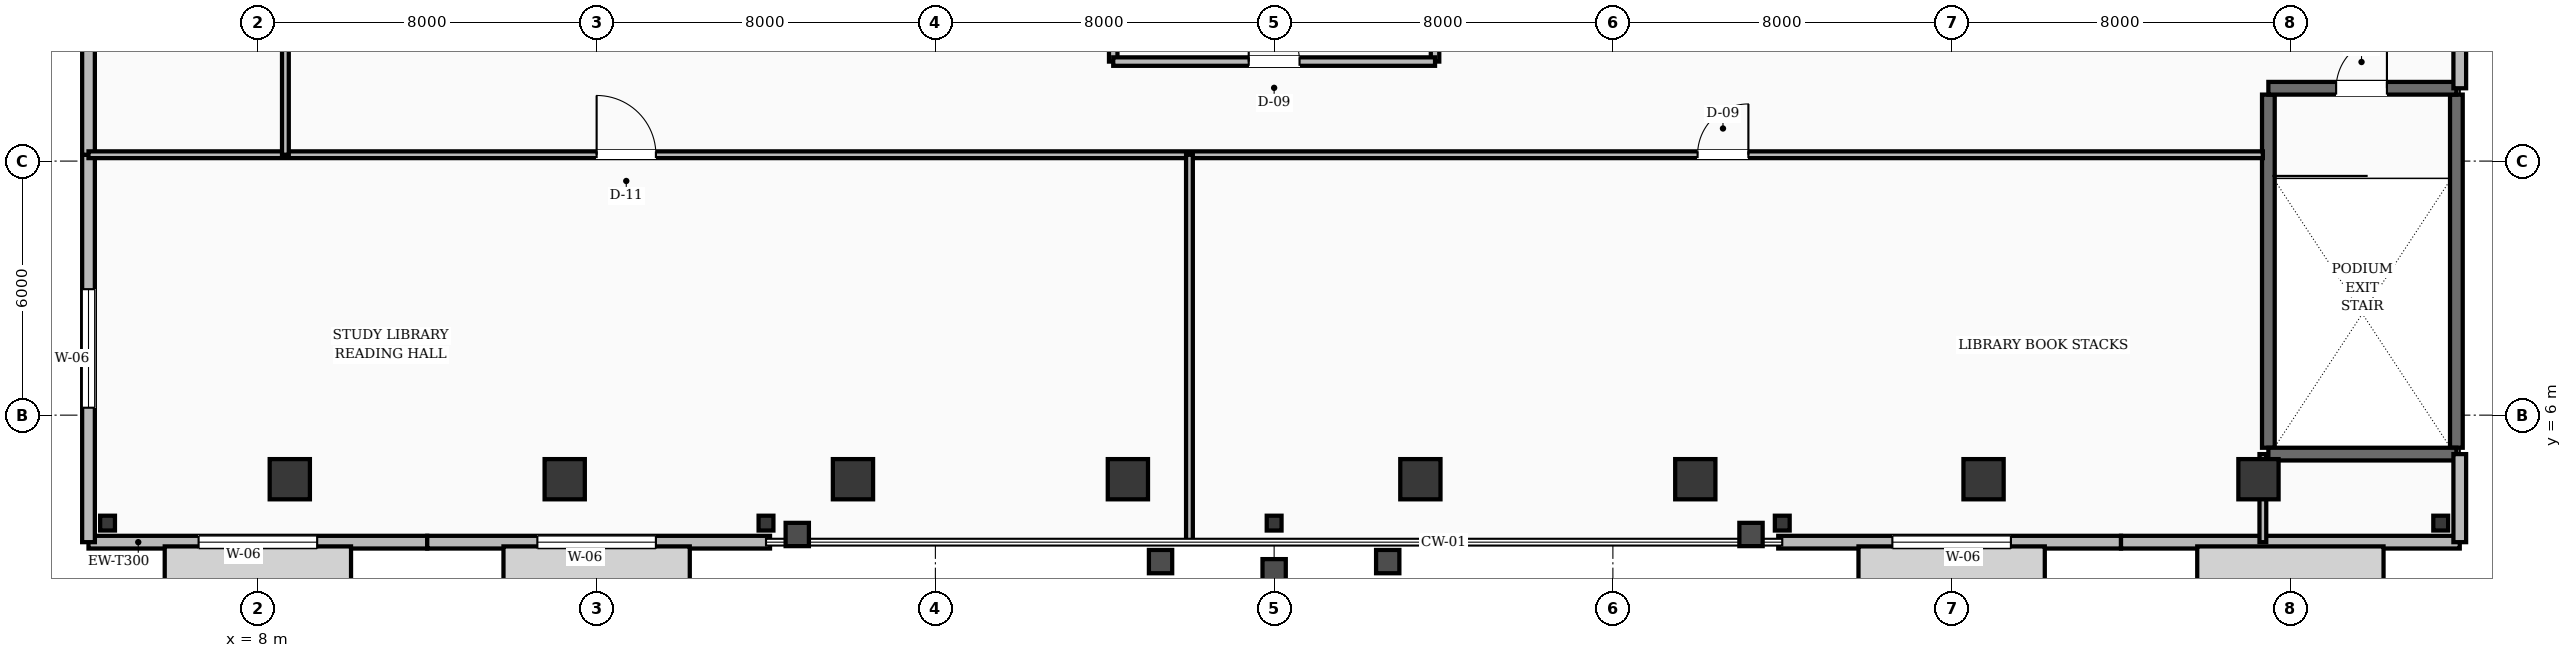
"""IFC4 building model, lengths in metres.
Left out: names, types, materials, properties, quantities, classifications, styles, units other than length and angle.
Written with IfcOpenShell. Run it as: python <this file> out.ifc"""

import sys

from ifc_helpers import new_model, si_unit, direction, frame, frame_2d, origin, origin_2d, place, context, subcontext, project, spatial, rectangle, hollow_circle, i_section, extrude, element, fill, save


model = new_model("IFC4")
c1 = context("Model", 3, precision=1e-05, world=origin(), true_north=direction((0.0, 1.0)))
c2 = subcontext(c1, "Body", "Model", "MODEL_VIEW")
j1 = project(units=[si_unit("LENGTHUNIT", "METRE"), si_unit("PLANEANGLEUNIT", "RADIAN")], contexts=[c1])
p1 = place(None, origin())
s1 = spatial("IfcSite", under=j1, at=p1, CompositionType="ELEMENT")
p2 = place(p1, origin())
s2 = spatial("IfcBuilding", under=s1, at=p2, CompositionType="ELEMENT")
p3 = place(p2, frame((0.0, 0.0, 19.6)))
s3 = spatial("IfcBuildingStorey", under=s2, at=p3, CompositionType="ELEMENT", Elevation=19.6)
for number, where, z_axis, x_axis in (
    (1, (55.48, 5.23, 0.0), (0.0, 0.0, 1.0), (0.0, 1.0, 0.0)),
    (2, (59.92, 5.23, 0.0), (0.0, 0.0, 1.0), (0.0, 1.0, 0.0)),
):
    element("IfcWall", number, at=place(p3, frame(where, z_axis=z_axis, x_axis=x_axis)), inside=s3, PredefinedType="SHEAR", context=c2, shape_type="SweptSolid", body=[
        extrude(rectangle(XDim=8.34, YDim=0.3, at=frame_2d((4.17, 0.0))), origin(), (0.0, 0.0, 1.0), 4.8),
    ])
p4 = place(p3, frame((55.48, 5.08, 0.0), z_axis=(0.0, 0.0, 1.0), x_axis=(1.0, 0.0, 0.0)))
e3 = element("IfcWall", 3, at=p4, inside=s3, PredefinedType="SHEAR", context=c2, shape_type="SweptSolid", body=[
    extrude(rectangle(XDim=4.44, YDim=0.3, at=frame_2d((2.22, 0.0))), origin(), (0.0, 0.0, 1.0), 4.8),
])
p5 = place(p3, frame((55.48, 13.72, 0.0), z_axis=(0.0, 0.0, 1.0), x_axis=(1.0, 0.0, 0.0)))
e4 = element("IfcWall", 4, at=p5, inside=s3, PredefinedType="SHEAR", context=c2, shape_type="SweptSolid", body=[
    extrude(rectangle(XDim=4.44, YDim=0.3, at=frame_2d((2.22, 0.0))), origin(), (0.0, 0.0, 1.0), 4.8),
])
p6 = place(p5, frame((1.6, 0.0, 0.0)))
e5 = element("IfcOpeningElement", 5, at=p6, cuts=e4, PredefinedType="OPENING", context=c2, shape_type="SweptSolid", body=[
    extrude(rectangle(XDim=1.2, YDim=2.1, at=frame_2d((0.6, 1.05))), frame((0.0, 0.16, 0.0), z_axis=(0.0, -1.0, 0.0), x_axis=(1.0, 0.0, 0.0)), (0.0, 0.0, 1.0), 0.32),
])
for number, where, z_axis, x_axis in (
    (6, (4.45, 3.45, 0.0), (0.0, 0.0, 1.0), (1.0, 0.0, 0.0)),
    (7, (20.0, 3.45, 0.0), (0.0, 0.0, 1.0), (1.0, 0.0, 0.0)),
    (8, (32.0, 3.45, 0.0), (0.0, 0.0, 1.0), (1.0, 0.0, 0.0)),
    (9, (44.0, 3.45, 0.0), (0.0, 0.0, 1.0), (1.0, 0.0, 0.0)),
    (10, (59.55, 3.45, 0.0), (0.0, 0.0, 1.0), (1.0, 0.0, 0.0)),
):
    element("IfcColumn", number, at=place(p3, frame(where, z_axis=z_axis, x_axis=x_axis)), inside=s3, PredefinedType="COLUMN", context=c2, shape_type="SweptSolid", body=[
        extrude(i_section(OverallWidth=0.35, OverallDepth=0.35, WebThickness=0.012, FlangeThickness=0.019, FilletRadius=0.016, at=origin_2d()), origin(), (0.0, 0.0, 1.0), 4.8),
    ])
for number, where, z_axis, x_axis in (
    (11, (9.008, 4.374, 0.0), (-0.105, 0.047, 0.993), (-0.407, -0.913, 0.0)),
    (12, (14.992, 4.374, 0.0), (0.105, 0.047, 0.993), (-0.407, 0.913, 0.0)),
    (13, (22.308, 4.374, 0.0), (-0.105, 0.047, 0.993), (-0.407, -0.913, 0.0)),
    (14, (28.292, 4.374, 0.0), (0.105, 0.047, 0.993), (-0.407, 0.913, 0.0)),
    (15, (35.708, 4.374, 0.0), (-0.105, 0.047, 0.993), (-0.407, -0.913, 0.0)),
    (16, (41.692, 4.374, 0.0), (0.105, 0.047, 0.993), (-0.407, 0.913, 0.0)),
    (17, (49.008, 4.374, 0.0), (-0.105, 0.047, 0.993), (-0.407, -0.913, 0.0)),
    (18, (54.992, 4.374, 0.0), (0.105, 0.047, 0.993), (-0.407, 0.913, 0.0)),
):
    element("IfcColumn", number, at=place(p3, frame(where, z_axis=z_axis, x_axis=x_axis)), inside=s3, PredefinedType="COLUMN", context=c2, shape_type="SweptSolid", body=[
        extrude(hollow_circle(Radius=0.475, WallThickness=0.045, at=origin_2d()), origin(), (0.0, 0.0, 1.0), 4.832),
    ])
p7 = place(p3, frame((4.0, 3.0, 0.0), z_axis=(0.0, 0.0, 1.0), x_axis=(1.0, 0.0, 0.0)))
e19 = element("IfcWall", 19, at=p7, inside=s3, PredefinedType="STANDARD", context=c2, shape_type="SweptSolid", body=[
    extrude(rectangle(XDim=8.0, YDim=0.3, at=frame_2d((4.0, 0.0))), origin(), (0.0, 0.0, 1.0), 3.47),
])
p8 = place(p7, frame((2.6, 0.0, 0.85)))
e20 = element("IfcOpeningElement", 20, at=p8, cuts=e19, PredefinedType="OPENING", context=c2, shape_type="SweptSolid", body=[
    extrude(rectangle(XDim=2.8, YDim=2.3, at=frame_2d((1.4, 1.15))), frame((0.0, 0.16, 0.0), z_axis=(0.0, -1.0, 0.0), x_axis=(1.0, 0.0, 0.0)), (0.0, 0.0, 1.0), 0.32),
])
p9 = place(p3, frame((12.0, 3.0, 0.0), z_axis=(0.0, 0.0, 1.0), x_axis=(1.0, 0.0, 0.0)))
e21 = element("IfcWall", 21, at=p9, inside=s3, PredefinedType="STANDARD", context=c2, shape_type="SweptSolid", body=[
    extrude(rectangle(XDim=8.095, YDim=0.3, at=frame_2d((4.047, 0.0))), origin(), (0.0, 0.0, 1.0), 3.47),
])
p10 = place(p9, frame((2.6, 0.0, 0.85)))
e22 = element("IfcOpeningElement", 22, at=p10, cuts=e21, PredefinedType="OPENING", context=c2, shape_type="SweptSolid", body=[
    extrude(rectangle(XDim=2.8, YDim=2.3, at=frame_2d((1.4, 1.15))), frame((0.0, 0.16, 0.0), z_axis=(0.0, -1.0, 0.0), x_axis=(1.0, 0.0, 0.0)), (0.0, 0.0, 1.0), 0.32),
])
p11 = place(p3, frame((43.905, 3.0, 0.0), z_axis=(0.0, 0.0, 1.0), x_axis=(1.0, 0.0, 0.0)))
e23 = element("IfcWall", 23, at=p11, inside=s3, PredefinedType="STANDARD", context=c2, shape_type="SweptSolid", body=[
    extrude(rectangle(XDim=8.095, YDim=0.3, at=frame_2d((4.047, 0.0))), origin(), (0.0, 0.0, 1.0), 3.47),
])
p12 = place(p11, frame((2.695, 0.0, 0.85)))
e24 = element("IfcOpeningElement", 24, at=p12, cuts=e23, PredefinedType="OPENING", context=c2, shape_type="SweptSolid", body=[
    extrude(rectangle(XDim=2.8, YDim=2.3, at=frame_2d((1.4, 1.15))), frame((0.0, 0.16, 0.0), z_axis=(0.0, -1.0, 0.0), x_axis=(1.0, 0.0, 0.0)), (0.0, 0.0, 1.0), 0.32),
])
p13 = place(p3, frame((52.0, 3.0, 0.0), z_axis=(0.0, 0.0, 1.0), x_axis=(1.0, 0.0, 0.0)))
e25 = element("IfcWall", 25, at=p13, inside=s3, PredefinedType="STANDARD", context=c2, shape_type="SweptSolid", body=[
    extrude(rectangle(XDim=8.0, YDim=0.3, at=frame_2d((4.0, 0.0))), origin(), (0.0, 0.0, 1.0), 3.47),
])
p14 = place(p3, frame((4.0, 12.15, 0.0), z_axis=(0.0, 0.0, 1.0), x_axis=(0.0, -1.0, 0.0)))
e26 = element("IfcWall", 26, at=p14, inside=s3, PredefinedType="STANDARD", context=c2, shape_type="SweptSolid", body=[
    extrude(rectangle(XDim=9.15, YDim=0.3, at=frame_2d((4.575, 0.0))), origin(), (0.0, 0.0, 1.0), 3.47),
])
p15 = place(p14, frame((3.175, 0.0, 0.85)))
e27 = element("IfcOpeningElement", 27, at=p15, cuts=e26, PredefinedType="OPENING", context=c2, shape_type="SweptSolid", body=[
    extrude(rectangle(XDim=2.8, YDim=2.3, at=frame_2d((1.4, 1.15))), frame((0.0, 0.16, 0.0), z_axis=(0.0, -1.0, 0.0), x_axis=(1.0, 0.0, 0.0)), (0.0, 0.0, 1.0), 0.32),
])
p16 = place(p3, frame((4.0, 22.0, 0.0), z_axis=(0.0, 0.0, 1.0), x_axis=(0.0, -1.0, 0.0)))
e28 = element("IfcWall", 28, at=p16, inside=s3, PredefinedType="STANDARD", context=c2, shape_type="SweptSolid", body=[
    extrude(rectangle(XDim=9.85, YDim=0.3, at=frame_2d((4.925, 0.0))), origin(), (0.0, 0.0, 1.0), 3.47),
])
p17 = place(p16, frame((3.525, 0.0, 0.85)))
e29 = element("IfcOpeningElement", 29, at=p17, cuts=e28, PredefinedType="OPENING", context=c2, shape_type="SweptSolid", body=[
    extrude(rectangle(XDim=2.8, YDim=2.3, at=frame_2d((1.4, 1.15))), frame((0.0, 0.16, 0.0), z_axis=(0.0, -1.0, 0.0), x_axis=(1.0, 0.0, 0.0)), (0.0, 0.0, 1.0), 0.32),
])
p18 = place(p3, frame((60.0, 3.0, 0.0), z_axis=(0.0, 0.0, 1.0), x_axis=(0.0, 1.0, 0.0)))
e30 = element("IfcWall", 30, at=p18, inside=s3, PredefinedType="STANDARD", context=c2, shape_type="SweptSolid", body=[
    extrude(rectangle(XDim=2.08, YDim=0.3, at=frame_2d((1.04, 0.0))), origin(), (0.0, 0.0, 1.0), 3.47),
])
p19 = place(p3, frame((60.0, 13.72, 0.0), z_axis=(0.0, 0.0, 1.0), x_axis=(0.0, 1.0, 0.0)))
e31 = element("IfcWall", 31, at=p19, inside=s3, PredefinedType="STANDARD", context=c2, shape_type="SweptSolid", body=[
    extrude(rectangle(XDim=1.83, YDim=0.3, at=frame_2d((0.915, 0.0))), origin(), (0.0, 0.0, 1.0), 3.47),
])
for number, where, z_axis, x_axis in (
    (32, (28.2, 14.35, 0.0), (0.0, 0.0, 1.0), (0.0, 1.0, 0.0)),
    (33, (35.8, 14.35, 0.0), (0.0, 0.0, 1.0), (0.0, 1.0, 0.0)),
):
    element("IfcWall", number, at=place(p3, frame(where, z_axis=z_axis, x_axis=x_axis)), inside=s3, PredefinedType="SOLIDWALL", context=c2, shape_type="SweptSolid", body=[
        extrude(rectangle(XDim=2.2, YDim=0.2, at=frame_2d((1.1, 0.0))), origin(), (0.0, 0.0, 1.0), 3.42),
    ])
p20 = place(p3, frame((28.2, 14.35, 0.0), z_axis=(0.0, 0.0, 1.0), x_axis=(1.0, 0.0, 0.0)))
e34 = element("IfcWall", 34, at=p20, inside=s3, PredefinedType="SOLIDWALL", context=c2, shape_type="SweptSolid", body=[
    extrude(rectangle(XDim=7.6, YDim=0.2, at=frame_2d((3.8, 0.0))), origin(), (0.0, 0.0, 1.0), 3.42),
])
p21 = place(p20, frame((3.2, 0.0, 0.0)))
e35 = element("IfcOpeningElement", 35, at=p21, cuts=e34, PredefinedType="OPENING", context=c2, shape_type="SweptSolid", body=[
    extrude(rectangle(XDim=1.2, YDim=2.1, at=frame_2d((0.6, 1.05))), frame((0.0, 0.11, 0.0), z_axis=(0.0, -1.0, 0.0), x_axis=(1.0, 0.0, 0.0)), (0.0, 0.0, 1.0), 0.22),
])
p22 = place(p3, frame((4.0, 12.15, 0.0), z_axis=(0.0, 0.0, 1.0), x_axis=(1.0, 0.0, 0.0)))
e36 = element("IfcWall", 36, at=p22, inside=s3, PredefinedType="SOLIDWALL", context=c2, shape_type="SweptSolid", body=[
    extrude(rectangle(XDim=51.35, YDim=0.16, at=frame_2d((25.675, 0.0))), origin(), (0.0, 0.0, 1.0), 3.42),
])
p23 = place(p22, frame((12.0, 0.0, 0.0)))
e37 = element("IfcOpeningElement", 37, at=p23, cuts=e36, PredefinedType="OPENING", context=c2, shape_type="SweptSolid", body=[
    extrude(rectangle(XDim=1.4, YDim=2.15, at=frame_2d((0.7, 1.075))), frame((0.0, 0.09, 0.0), z_axis=(0.0, -1.0, 0.0), x_axis=(1.0, 0.0, 0.0)), (0.0, 0.0, 1.0), 0.18),
])
p24 = place(p22, frame((38.0, 0.0, 0.0)))
e38 = element("IfcOpeningElement", 38, at=p24, cuts=e36, PredefinedType="OPENING", context=c2, shape_type="SweptSolid", body=[
    extrude(rectangle(XDim=1.2, YDim=2.1, at=frame_2d((0.6, 1.05))), frame((0.0, 0.09, 0.0), z_axis=(0.0, -1.0, 0.0), x_axis=(1.0, 0.0, 0.0)), (0.0, 0.0, 1.0), 0.18),
])
p25 = place(p3, frame((8.65, 12.15, 0.0), z_axis=(0.0, 0.0, 1.0), x_axis=(0.0, 1.0, 0.0)))
e39 = element("IfcWall", 39, at=p25, inside=s3, PredefinedType="SOLIDWALL", context=c2, shape_type="SweptSolid", body=[
    extrude(rectangle(XDim=20.25, YDim=0.16, at=frame_2d((10.125, 0.0))), origin(), (0.0, 0.0, 1.0), 3.42),
])
p26 = place(p25, frame((8.0, 0.0, 0.0)))
e40 = element("IfcOpeningElement", 40, at=p26, cuts=e39, PredefinedType="OPENING", context=c2, shape_type="SweptSolid", body=[
    extrude(rectangle(XDim=1.0, YDim=2.1, at=frame_2d((0.5, 1.05))), frame((0.0, 0.09, 0.0), z_axis=(0.0, -1.0, 0.0), x_axis=(1.0, 0.0, 0.0)), (0.0, 0.0, 1.0), 0.18),
])
p27 = place(p3, frame((30.0, 3.0, 0.0), z_axis=(0.0, 0.0, 1.0), x_axis=(0.0, 1.0, 0.0)))
e41 = element("IfcWall", 41, at=p27, inside=s3, PredefinedType="SOLIDWALL", context=c2, shape_type="SweptSolid", body=[
    extrude(rectangle(XDim=9.15, YDim=0.16, at=frame_2d((4.575, 0.0))), origin(), (0.0, 0.0, 1.0), 3.42),
])
p28 = place(p3, frame((55.35, 3.0, 0.0), z_axis=(0.0, 0.0, 1.0), x_axis=(0.0, 1.0, 0.0)))
e42 = element("IfcWall", 42, at=p28, inside=s3, PredefinedType="SOLIDWALL", context=c2, shape_type="SweptSolid", body=[
    extrude(rectangle(XDim=2.08, YDim=0.16, at=frame_2d((1.04, 0.0))), origin(), (0.0, 0.0, 1.0), 3.42),
])
p29 = place(p8, origin())
e43 = element("IfcWindow", 43, at=p29, inside=s3, PartitioningType="SINGLE_PANEL", PredefinedType="WINDOW", context=c2, shape_type="SweptSolid", body=[
    extrude(rectangle(XDim=2.8, YDim=2.3, at=frame_2d((1.4, 1.15))), frame((0.0, 0.03, 0.0), z_axis=(0.0, -1.0, 0.0), x_axis=(1.0, 0.0, 0.0)), (0.0, 0.0, 1.0), 0.06),
])
fill(e20, e43)
p30 = place(p10, origin())
e44 = element("IfcWindow", 44, at=p30, inside=s3, PartitioningType="SINGLE_PANEL", PredefinedType="WINDOW", context=c2, shape_type="SweptSolid", body=[
    extrude(rectangle(XDim=2.8, YDim=2.3, at=frame_2d((1.4, 1.15))), frame((0.0, 0.03, 0.0), z_axis=(0.0, -1.0, 0.0), x_axis=(1.0, 0.0, 0.0)), (0.0, 0.0, 1.0), 0.06),
])
fill(e22, e44)
p31 = place(p12, origin())
e45 = element("IfcWindow", 45, at=p31, inside=s3, PartitioningType="SINGLE_PANEL", PredefinedType="WINDOW", context=c2, shape_type="SweptSolid", body=[
    extrude(rectangle(XDim=2.8, YDim=2.3, at=frame_2d((1.4, 1.15))), frame((0.0, 0.03, 0.0), z_axis=(0.0, -1.0, 0.0), x_axis=(1.0, 0.0, 0.0)), (0.0, 0.0, 1.0), 0.06),
])
fill(e24, e45)
p32 = place(p15, origin())
e46 = element("IfcWindow", 46, at=p32, inside=s3, PartitioningType="SINGLE_PANEL", PredefinedType="WINDOW", context=c2, shape_type="SweptSolid", body=[
    extrude(rectangle(XDim=2.8, YDim=2.3, at=frame_2d((1.4, 1.15))), frame((0.0, 0.03, 0.0), z_axis=(0.0, -1.0, 0.0), x_axis=(1.0, 0.0, 0.0)), (0.0, 0.0, 1.0), 0.06),
])
fill(e27, e46)
p33 = place(p6, origin())
e47 = element("IfcDoor", 47, at=p33, inside=s3, OperationType="SINGLE_SWING_RIGHT", PredefinedType="DOOR", context=c2, shape_type="SweptSolid", body=[
    extrude(rectangle(XDim=1.2, YDim=2.1, at=frame_2d((0.6, 1.05))), frame((0.0, 0.025, 0.0), z_axis=(0.0, -1.0, 0.0), x_axis=(1.0, 0.0, 0.0)), (0.0, 0.0, 1.0), 0.05),
])
fill(e5, e47)
p34 = place(p21, origin())
e48 = element("IfcDoor", 48, at=p34, inside=s3, OperationType="SINGLE_SWING_LEFT", PredefinedType="DOOR", context=c2, shape_type="SweptSolid", body=[
    extrude(rectangle(XDim=1.2, YDim=2.1, at=frame_2d((0.6, 1.05))), frame((0.0, 0.025, 0.0), z_axis=(0.0, -1.0, 0.0), x_axis=(1.0, 0.0, 0.0)), (0.0, 0.0, 1.0), 0.05),
])
fill(e35, e48)
p35 = place(p23, origin())
e49 = element("IfcDoor", 49, at=p35, inside=s3, OperationType="SINGLE_SWING_LEFT", PredefinedType="DOOR", context=c2, shape_type="SweptSolid", body=[
    extrude(rectangle(XDim=1.4, YDim=2.15, at=frame_2d((0.7, 1.075))), frame((0.0, 0.025, 0.0), z_axis=(0.0, -1.0, 0.0), x_axis=(1.0, 0.0, 0.0)), (0.0, 0.0, 1.0), 0.05),
])
fill(e37, e49)
p36 = place(p24, origin())
e50 = element("IfcDoor", 50, at=p36, inside=s3, OperationType="SINGLE_SWING_RIGHT", PredefinedType="DOOR", context=c2, shape_type="SweptSolid", body=[
    extrude(rectangle(XDim=1.2, YDim=2.1, at=frame_2d((0.6, 1.05))), frame((0.0, 0.025, 0.0), z_axis=(0.0, -1.0, 0.0), x_axis=(1.0, 0.0, 0.0)), (0.0, 0.0, 1.0), 0.05),
])
fill(e38, e50)
save(model, sys.argv[1])
